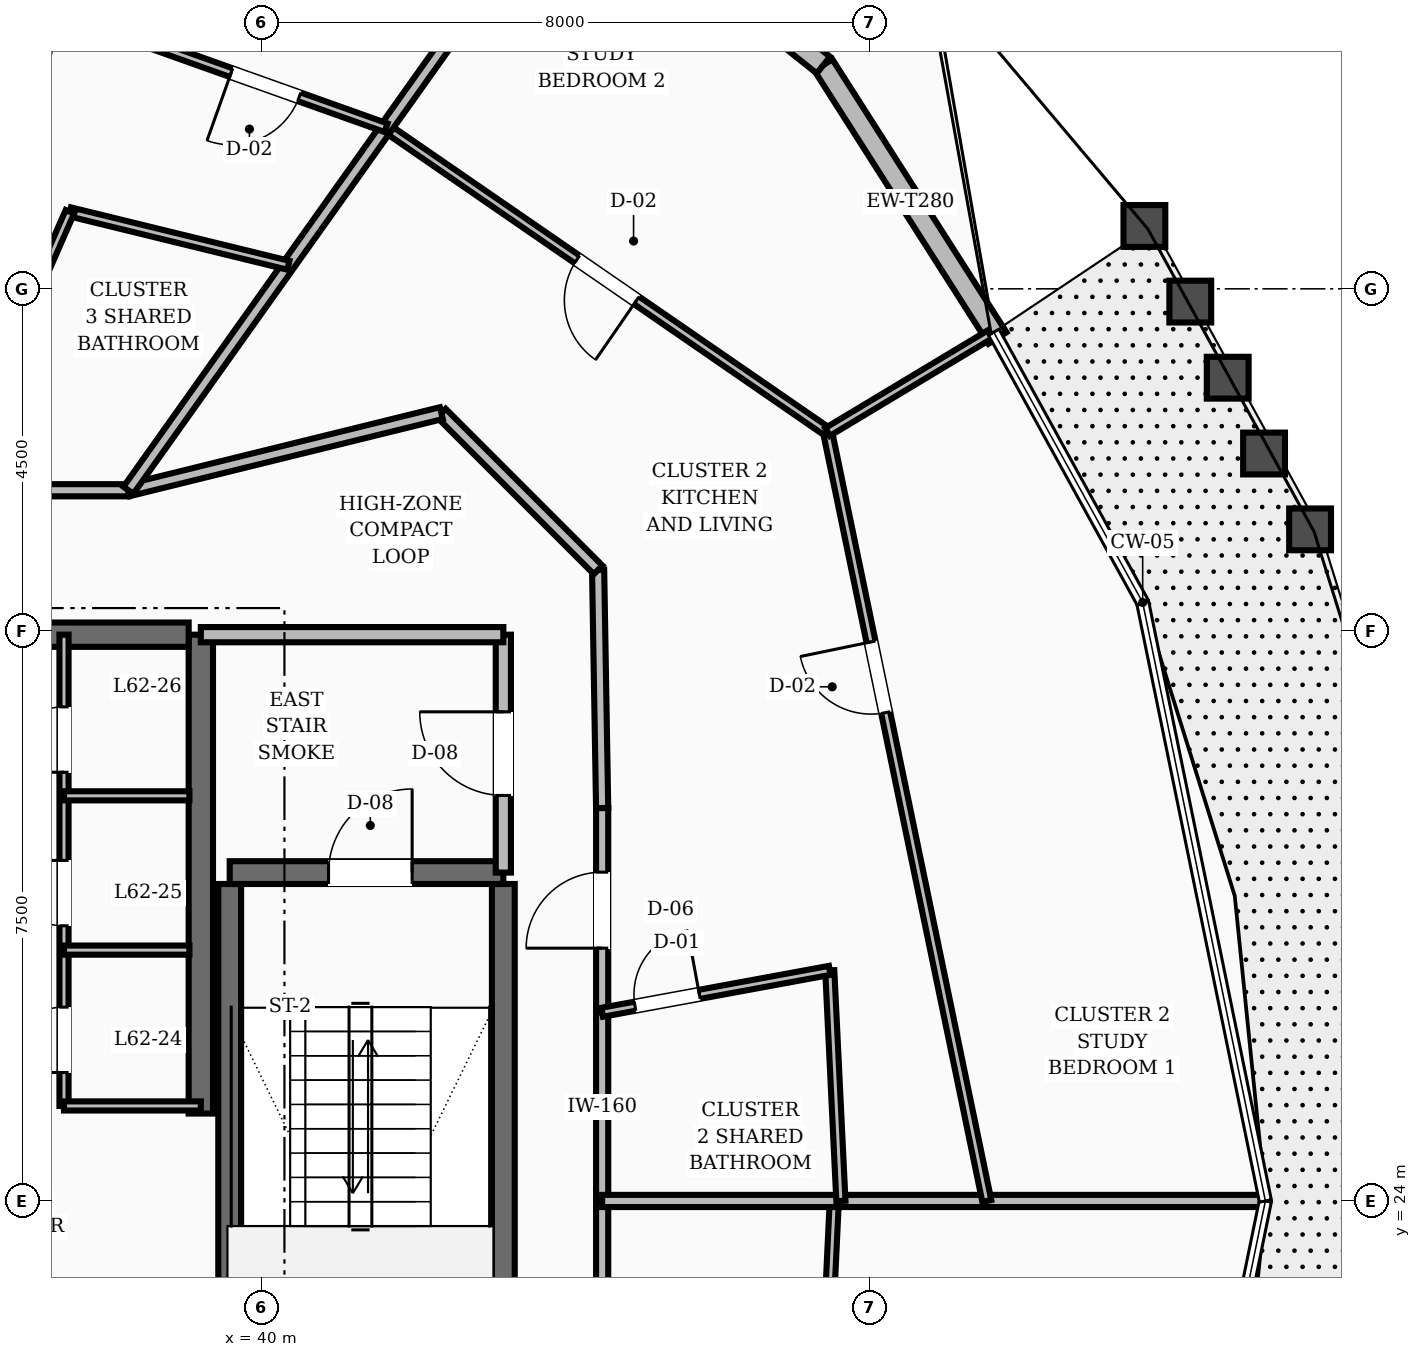
"""IFC4 building model, lengths in metres.
Left out: names, types, materials, properties, quantities, classifications, styles, units other than length and angle.
Written with IfcOpenShell. Run it as: python <this file> out.ifc"""

import sys

from ifc_helpers import new_model, si_unit, direction, frame, frame_2d, origin, place, context, subcontext, project, spatial, rectangle, extrude, element, fill, save


model = new_model("IFC4")
c1 = context("Model", 3, precision=1e-05, world=origin(), true_north=direction((0.0, 1.0)))
c2 = subcontext(c1, "Body", "Model", "MODEL_VIEW")
j1 = project(units=[si_unit("LENGTHUNIT", "METRE"), si_unit("PLANEANGLEUNIT", "RADIAN")], contexts=[c1])
p1 = place(None, origin())
s1 = spatial("IfcSite", under=j1, at=p1, CompositionType="ELEMENT")
p2 = place(p1, origin())
s2 = spatial("IfcBuilding", under=s1, at=p2, CompositionType="ELEMENT")
p3 = place(p2, frame((0.0, 0.0, 240.0)))
s3 = spatial("IfcBuildingStorey", under=s2, at=p3, CompositionType="ELEMENT", Elevation=240.0)
p4 = place(p3, frame((39.2, 25.15, 0.0), z_axis=(0.0, 0.0, 1.0), x_axis=(0.0, 1.0, 0.0)))
e1 = element("IfcWall", 1, at=p4, inside=s3, PredefinedType="SHEAR", context=c2, shape_type="SweptSolid", body=[
    extrude(rectangle(XDim=6.3, YDim=0.32, at=frame_2d((3.15, 0.0))), origin(), (0.0, 0.0, 1.0), 3.6),
])
p5 = place(p3, frame((35.8, 31.45, 0.0), z_axis=(0.0, 0.0, 1.0), x_axis=(1.0, 0.0, 0.0)))
e2 = element("IfcWall", 2, at=p5, inside=s3, PredefinedType="SHEAR", context=c2, shape_type="SweptSolid", body=[
    extrude(rectangle(XDim=3.24, YDim=0.32, at=frame_2d((1.62, 0.0))), origin(), (0.0, 0.0, 1.0), 3.6),
])
p6 = place(p5, frame((0.3, 0.0, 0.0)))
e3 = element("IfcOpeningElement", 3, at=p6, cuts=e2, PredefinedType="OPENING", context=c2, shape_type="SweptSolid", body=[
    extrude(rectangle(XDim=1.1, YDim=2.1, at=frame_2d((0.55, 1.05))), frame((0.0, 0.17, 0.0), z_axis=(0.0, -1.0, 0.0), x_axis=(1.0, 0.0, 0.0)), (0.0, 0.0, 1.0), 0.34),
])
for number, where, z_axis, x_axis in (
    (4, (43.18, 19.43, 0.0), (0.0, 0.0, 1.0), (0.0, 1.0, 0.0)),
    (5, (39.58, 19.43, 0.0), (0.0, 0.0, 1.0), (0.0, 1.0, 0.0)),
):
    element("IfcWall", number, at=place(p3, frame(where, z_axis=z_axis, x_axis=x_axis)), inside=s3, PredefinedType="SHEAR", context=c2, shape_type="SweptSolid", body=[
        extrude(rectangle(XDim=8.74, YDim=0.3, at=frame_2d((4.37, 0.0))), origin(), (0.0, 0.0, 1.0), 3.6),
    ])
p7 = place(p3, frame((39.58, 28.32, 0.0), z_axis=(0.0, 0.0, 1.0), x_axis=(1.0, 0.0, 0.0)))
e6 = element("IfcWall", 6, at=p7, inside=s3, PredefinedType="SHEAR", context=c2, shape_type="SweptSolid", body=[
    extrude(rectangle(XDim=3.6, YDim=0.3, at=frame_2d((1.8, 0.0))), origin(), (0.0, 0.0, 1.0), 3.6),
])
p8 = place(p7, frame((1.3, 0.0, 0.0)))
e7 = element("IfcOpeningElement", 7, at=p8, cuts=e6, PredefinedType="OPENING", context=c2, shape_type="SweptSolid", body=[
    extrude(rectangle(XDim=1.1, YDim=2.1, at=frame_2d((0.55, 1.05))), frame((0.0, 0.16, 0.0), z_axis=(0.0, -1.0, 0.0), x_axis=(1.0, 0.0, 0.0)), (0.0, 0.0, 1.0), 0.32),
])
p9 = place(p3, frame((49.681, 35.353, 0.0), z_axis=(0.0, 0.0, 1.0), x_axis=(-0.537776362765, 0.843087530243, 0.0)))
e8 = element("IfcWall", 8, at=p9, inside=s3, PredefinedType="STANDARD", context=c2, shape_type="SweptSolid", body=[
    extrude(rectangle(XDim=4.26, YDim=0.28, at=frame_2d((2.13, 0.0))), origin(), (0.0, 0.0, 1.0), 2.88),
])
p10 = place(p3, frame((47.39, 38.944, 0.0), z_axis=(0.0, 0.0, 1.0), x_axis=(-0.782030895384, 0.623239663906, 0.0)))
e9 = element("IfcWall", 9, at=p10, inside=s3, PredefinedType="STANDARD", context=c2, shape_type="SweptSolid", body=[
    extrude(rectangle(XDim=4.217, YDim=0.28, at=frame_2d((2.109, 0.0))), origin(), (0.0, 0.0, 1.0), 2.88),
])
p11 = place(p10, frame((0.809, 0.0, 0.8)))
e10 = element("IfcOpeningElement", 10, at=p11, cuts=e9, PredefinedType="OPENING", context=c2, shape_type="SweptSolid", body=[
    extrude(rectangle(XDim=2.6, YDim=1.65, at=frame_2d((1.3, 0.825))), frame((0.0, 0.15, 0.0), z_axis=(0.0, -1.0, 0.0), x_axis=(1.0, 0.0, 0.0)), (0.0, 0.0, 1.0), 0.3),
])
p12 = place(p3, frame((43.18, 28.32, 0.0), z_axis=(0.0, 0.0, 1.0), x_axis=(0.0, 1.0, 0.0)))
e11 = element("IfcWall", 11, at=p12, inside=s3, PredefinedType="SOLIDWALL", context=c2, shape_type="SweptSolid", body=[
    extrude(rectangle(XDim=3.13, YDim=0.2, at=frame_2d((1.565, 0.0))), origin(), (0.0, 0.0, 1.0), 2.87),
])
p13 = place(p12, frame((1.015, 0.0, 0.0)))
e12 = element("IfcOpeningElement", 12, at=p13, cuts=e11, PredefinedType="OPENING", context=c2, shape_type="SweptSolid", body=[
    extrude(rectangle(XDim=1.1, YDim=2.1, at=frame_2d((0.55, 1.05))), frame((0.0, 0.11, 0.0), z_axis=(0.0, -1.0, 0.0), x_axis=(1.0, 0.0, 0.0)), (0.0, 0.0, 1.0), 0.22),
])
p14 = place(p3, frame((39.2, 31.45, 0.0), z_axis=(0.0, 0.0, 1.0), x_axis=(1.0, 0.0, 0.0)))
e13 = element("IfcWall", 13, at=p14, inside=s3, PredefinedType="SOLIDWALL", context=c2, shape_type="SweptSolid", body=[
    extrude(rectangle(XDim=3.98, YDim=0.2, at=frame_2d((1.99, 0.0))), origin(), (0.0, 0.0, 1.0), 2.87),
])
p15 = place(p3, frame((37.4, 25.25, 0.0), z_axis=(0.0, 0.0, 1.0), x_axis=(0.0, 1.0, 0.0)))
e14 = element("IfcWall", 14, at=p15, inside=s3, PredefinedType="PARTITIONING", context=c2, shape_type="SweptSolid", body=[
    extrude(rectangle(XDim=6.2, YDim=0.12, at=frame_2d((3.1, 0.0))), origin(), (0.0, 0.0, 1.0), 2.87),
])
p16 = place(p15, frame((0.44, 0.0, 0.0)))
e15 = element("IfcOpeningElement", 15, at=p16, cuts=e14, PredefinedType="OPENING", context=c2, shape_type="SweptSolid", body=[
    extrude(rectangle(XDim=0.86, YDim=2.1, at=frame_2d((0.43, 1.05))), frame((0.0, 0.07, 0.0), z_axis=(0.0, -1.0, 0.0), x_axis=(1.0, 0.0, 0.0)), (0.0, 0.0, 1.0), 0.14),
])
p17 = place(p15, frame((2.37, 0.0, 0.0)))
e16 = element("IfcOpeningElement", 16, at=p17, cuts=e14, PredefinedType="OPENING", context=c2, shape_type="SweptSolid", body=[
    extrude(rectangle(XDim=0.86, YDim=2.1, at=frame_2d((0.43, 1.05))), frame((0.0, 0.07, 0.0), z_axis=(0.0, -1.0, 0.0), x_axis=(1.0, 0.0, 0.0)), (0.0, 0.0, 1.0), 0.14),
])
p18 = place(p15, frame((4.39, 0.0, 0.0)))
e17 = element("IfcOpeningElement", 17, at=p18, cuts=e14, PredefinedType="OPENING", context=c2, shape_type="SweptSolid", body=[
    extrude(rectangle(XDim=0.86, YDim=2.1, at=frame_2d((0.43, 1.05))), frame((0.0, 0.07, 0.0), z_axis=(0.0, -1.0, 0.0), x_axis=(1.0, 0.0, 0.0)), (0.0, 0.0, 1.0), 0.14),
])
p19 = place(p3, frame((37.4, 25.25, 0.0), z_axis=(0.0, 0.0, 1.0), x_axis=(1.0, 0.0, 0.0)))
e18 = element("IfcWall", 18, at=p19, inside=s3, PredefinedType="PARTITIONING", context=c2, shape_type="SweptSolid", body=[
    extrude(rectangle(XDim=1.8, YDim=0.12, at=frame_2d((0.9, 0.0))), origin(), (0.0, 0.0, 1.0), 2.87),
])
for number, where, z_axis, x_axis in (
    (19, (37.4, 27.3, 0.0), (0.0, 0.0, 1.0), (1.0, 0.0, 0.0)),
    (20, (37.4, 29.33, 0.0), (0.0, 0.0, 1.0), (1.0, 0.0, 0.0)),
):
    element("IfcWall", number, at=place(p3, frame(where, z_axis=z_axis, x_axis=x_axis)), inside=s3, PredefinedType="PARTITIONING", context=c2, shape_type="SweptSolid", body=[
        extrude(rectangle(XDim=1.65, YDim=0.12, at=frame_2d((0.825, 0.0))), origin(), (0.0, 0.0, 1.0), 2.87),
    ])
p20 = place(p3, frame((44.48, 24.0, 0.0), z_axis=(0.0, 0.0, 1.0), x_axis=(0.0, 1.0, 0.0)))
e21 = element("IfcWall", 21, at=p20, inside=s3, PredefinedType="SOLIDWALL", context=c2, shape_type="SweptSolid", body=[
    extrude(rectangle(XDim=2.482, YDim=0.16, at=frame_2d((1.241, 0.0))), origin(), (0.0, 0.0, 1.0), 2.87),
])
p21 = place(p3, frame((44.48, 26.482, 0.0), z_axis=(0.0, 0.0, 1.0), x_axis=(0.0, 1.0, 0.0)))
e22 = element("IfcWall", 22, at=p21, inside=s3, PredefinedType="SOLIDWALL", context=c2, shape_type="SweptSolid", body=[
    extrude(rectangle(XDim=2.687, YDim=0.16, at=frame_2d((1.344, 0.0))), origin(), (0.0, 0.0, 1.0), 2.87),
])
p22 = place(p21, frame((0.844, 0.0, 0.0)))
e23 = element("IfcOpeningElement", 23, at=p22, cuts=e22, PredefinedType="OPENING", context=c2, shape_type="SweptSolid", body=[
    extrude(rectangle(XDim=1.0, YDim=2.1, at=frame_2d((0.5, 1.05))), frame((0.0, 0.09, 0.0), z_axis=(0.0, -1.0, 0.0), x_axis=(1.0, 0.0, 0.0)), (0.0, 0.0, 1.0), 0.18),
])
p23 = place(p3, frame((44.48, 29.169, 0.0), z_axis=(0.0, 0.0, 1.0), x_axis=(-0.016981035134, 0.999855811828, 0.0)))
e24 = element("IfcWall", 24, at=p23, inside=s3, PredefinedType="SOLIDWALL", context=c2, shape_type="SweptSolid", body=[
    extrude(rectangle(XDim=3.134, YDim=0.16, at=frame_2d((1.567, 0.0))), origin(), (0.0, 0.0, 1.0), 2.87),
])
p24 = place(p3, frame((44.427, 32.303, 0.0), z_axis=(0.0, 0.0, 1.0), x_axis=(-0.707106781187, 0.707106781187, 0.0)))
e25 = element("IfcWall", 25, at=p24, inside=s3, PredefinedType="SOLIDWALL", context=c2, shape_type="SweptSolid", body=[
    extrude(rectangle(XDim=2.916, YDim=0.16, at=frame_2d((1.458, 0.0))), origin(), (0.0, 0.0, 1.0), 2.87),
])
p25 = place(p3, frame((42.365, 34.365, 0.0), z_axis=(0.0, 0.0, 1.0), x_axis=(-0.970939799552, -0.239323850978, 0.0)))
e26 = element("IfcWall", 26, at=p25, inside=s3, PredefinedType="SOLIDWALL", context=c2, shape_type="SweptSolid", body=[
    extrude(rectangle(XDim=4.241, YDim=0.16, at=frame_2d((2.12, 0.0))), origin(), (0.0, 0.0, 1.0), 2.87),
])
p26 = place(p3, frame((38.248, 33.35, 0.0), z_axis=(0.0, 0.0, 1.0), x_axis=(-1.0, 0.0, 0.0)))
e27 = element("IfcWall", 27, at=p26, inside=s3, PredefinedType="SOLIDWALL", context=c2, shape_type="SweptSolid", body=[
    extrude(rectangle(XDim=2.375, YDim=0.16, at=frame_2d((1.188, 0.0))), origin(), (0.0, 0.0, 1.0), 2.87),
])
p27 = place(p3, frame((44.48, 21.518, 0.0), z_axis=(0.0, 0.0, 1.0), x_axis=(0.0, 1.0, 0.0)))
e28 = element("IfcWall", 28, at=p27, inside=s3, PredefinedType="SOLIDWALL", context=c2, shape_type="SweptSolid", body=[
    extrude(rectangle(XDim=2.482, YDim=0.16, at=frame_2d((1.241, 0.0))), origin(), (0.0, 0.0, 1.0), 2.87),
])
p28 = place(p3, frame((47.391, 20.982, 0.0), z_axis=(0.0, 0.0, 1.0), x_axis=(0.047185110315, 0.998886162365, 0.0)))
e29 = element("IfcWall", 29, at=p28, inside=s3, PredefinedType="PARTITIONING", context=c2, shape_type="SweptSolid", body=[
    extrude(rectangle(XDim=3.022, YDim=0.12, at=frame_2d((1.511, 0.0))), origin(), (0.0, 0.0, 1.0), 2.87),
])
p29 = place(p3, frame((44.48, 24.0, 0.0), z_axis=(0.0, 0.0, 1.0), x_axis=(1.0, 0.0, 0.0)))
e30 = element("IfcWall", 30, at=p29, inside=s3, PredefinedType="SOLIDWALL", context=c2, shape_type="SweptSolid", body=[
    extrude(rectangle(XDim=8.676, YDim=0.16, at=frame_2d((4.338, 0.0))), origin(), (0.0, 0.0, 1.0), 2.87),
])
p30 = place(p3, frame((47.621, 24.0, 0.0), z_axis=(0.0, 0.0, 1.0), x_axis=(-0.048309856008, 0.998832397258, 0.0)))
e31 = element("IfcWall", 31, at=p30, inside=s3, PredefinedType="PARTITIONING", context=c2, shape_type="SweptSolid", body=[
    extrude(rectangle(XDim=3.037, YDim=0.12, at=frame_2d((1.519, 0.0))), origin(), (0.0, 0.0, 1.0), 2.87),
])
p31 = place(p3, frame((44.48, 26.482, 0.0), z_axis=(0.0, 0.0, 1.0), x_axis=(0.983472356652, 0.181058343361, 0.0)))
e32 = element("IfcWall", 32, at=p31, inside=s3, PredefinedType="PARTITIONING", context=c2, shape_type="SweptSolid", body=[
    extrude(rectangle(XDim=3.045, YDim=0.12, at=frame_2d((1.522, 0.0))), origin(), (0.0, 0.0, 1.0), 2.87),
])
p32 = place(p31, frame((0.44, 0.0, 0.0)))
e33 = element("IfcOpeningElement", 33, at=p32, cuts=e32, PredefinedType="OPENING", context=c2, shape_type="SweptSolid", body=[
    extrude(rectangle(XDim=0.86, YDim=2.1, at=frame_2d((0.43, 1.05))), frame((0.0, 0.07, 0.0), z_axis=(0.0, -1.0, 0.0), x_axis=(1.0, 0.0, 0.0)), (0.0, 0.0, 1.0), 0.14),
])
p33 = place(p3, frame((49.541, 24.0, 0.0), z_axis=(0.0, 0.0, 1.0), x_axis=(-0.202796260228, 0.979220954043, 0.0)))
e34 = element("IfcWall", 34, at=p33, inside=s3, PredefinedType="PARTITIONING", context=c2, shape_type="SweptSolid", body=[
    extrude(rectangle(XDim=10.332, YDim=0.12, at=frame_2d((5.166, 0.0))), origin(), (0.0, 0.0, 1.0), 2.87),
])
p34 = place(p33, frame((6.561, 0.0, 0.0)))
e35 = element("IfcOpeningElement", 35, at=p34, cuts=e34, PredefinedType="OPENING", context=c2, shape_type="SweptSolid", body=[
    extrude(rectangle(XDim=0.95, YDim=2.1, at=frame_2d((0.475, 1.05))), frame((0.0, 0.07, 0.0), z_axis=(0.0, -1.0, 0.0), x_axis=(1.0, 0.0, 0.0)), (0.0, 0.0, 1.0), 0.14),
])
p35 = place(p3, frame((47.446, 34.117, 0.0), z_axis=(0.0, 0.0, 1.0), x_axis=(-0.823453694919, 0.567383479072, 0.0)))
e36 = element("IfcWall", 36, at=p35, inside=s3, PredefinedType="PARTITIONING", context=c2, shape_type="SweptSolid", body=[
    extrude(rectangle(XDim=7.053, YDim=0.12, at=frame_2d((3.527, 0.0))), origin(), (0.0, 0.0, 1.0), 2.87),
])
p36 = place(p35, frame((3.052, 0.0, 0.0)))
e37 = element("IfcOpeningElement", 37, at=p36, cuts=e36, PredefinedType="OPENING", context=c2, shape_type="SweptSolid", body=[
    extrude(rectangle(XDim=0.95, YDim=2.1, at=frame_2d((0.475, 1.05))), frame((0.0, 0.07, 0.0), z_axis=(0.0, -1.0, 0.0), x_axis=(1.0, 0.0, 0.0)), (0.0, 0.0, 1.0), 0.14),
])
p37 = place(p3, frame((47.446, 34.117, 0.0), z_axis=(0.0, 0.0, 1.0), x_axis=(0.85718258358, 0.515012639075, 0.0)))
e38 = element("IfcWall", 38, at=p37, inside=s3, PredefinedType="PARTITIONING", context=c2, shape_type="SweptSolid", body=[
    extrude(rectangle(XDim=2.5, YDim=0.12, at=frame_2d((1.25, 0.0))), origin(), (0.0, 0.0, 1.0), 2.87),
])
p38 = place(p3, frame((38.248, 33.35, 0.0), z_axis=(0.0, 0.0, 1.0), x_axis=(0.579377676694, 0.815059205058, 0.0)))
e39 = element("IfcWall", 39, at=p38, inside=s3, PredefinedType="SOLIDWALL", context=c2, shape_type="SweptSolid", body=[
    extrude(rectangle(XDim=10.038, YDim=0.16, at=frame_2d((5.019, 0.0))), origin(), (0.0, 0.0, 1.0), 2.87),
])
p39 = place(p3, frame((40.352, 36.31, 0.0), z_axis=(0.0, 0.0, 1.0), x_axis=(-0.971357969052, 0.237620908084, 0.0)))
e40 = element("IfcWall", 40, at=p39, inside=s3, PredefinedType="PARTITIONING", context=c2, shape_type="SweptSolid", body=[
    extrude(rectangle(XDim=2.959, YDim=0.12, at=frame_2d((1.479, 0.0))), origin(), (0.0, 0.0, 1.0), 2.87),
])
p40 = place(p3, frame((35.873, 33.35, 0.0), z_axis=(0.0, 0.0, 1.0), x_axis=(0.401215916975, 0.915983508566, 0.0)))
e41 = element("IfcWall", 41, at=p40, inside=s3, PredefinedType="PARTITIONING", context=c2, shape_type="SweptSolid", body=[
    extrude(rectangle(XDim=3.999, YDim=0.12, at=frame_2d((2.0, 0.0))), origin(), (0.0, 0.0, 1.0), 2.87),
])
p41 = place(p40, frame((0.44, 0.0, 0.0)))
e42 = element("IfcOpeningElement", 42, at=p41, cuts=e41, PredefinedType="OPENING", context=c2, shape_type="SweptSolid", body=[
    extrude(rectangle(XDim=0.86, YDim=2.1, at=frame_2d((0.43, 1.05))), frame((0.0, 0.07, 0.0), z_axis=(0.0, -1.0, 0.0), x_axis=(1.0, 0.0, 0.0)), (0.0, 0.0, 1.0), 0.14),
])
p42 = place(p3, frame((41.637, 38.119, 0.0), z_axis=(0.0, 0.0, 1.0), x_axis=(-0.942011593526, 0.335580329671, 0.0)))
e43 = element("IfcWall", 43, at=p42, inside=s3, PredefinedType="PARTITIONING", context=c2, shape_type="SweptSolid", body=[
    extrude(rectangle(XDim=3.376, YDim=0.12, at=frame_2d((1.688, 0.0))), origin(), (0.0, 0.0, 1.0), 2.87),
])
p43 = place(p42, frame((1.213, 0.0, 0.0)))
e44 = element("IfcOpeningElement", 44, at=p43, cuts=e43, PredefinedType="OPENING", context=c2, shape_type="SweptSolid", body=[
    extrude(rectangle(XDim=0.95, YDim=2.1, at=frame_2d((0.475, 1.05))), frame((0.0, 0.07, 0.0), z_axis=(0.0, -1.0, 0.0), x_axis=(1.0, 0.0, 0.0)), (0.0, 0.0, 1.0), 0.14),
])
p44 = place(p8, origin())
e45 = element("IfcDoor", 45, at=p44, inside=s3, OperationType="SINGLE_SWING_RIGHT", PredefinedType="DOOR", context=c2, shape_type="SweptSolid", body=[
    extrude(rectangle(XDim=1.1, YDim=2.1, at=frame_2d((0.55, 1.05))), frame((0.0, 0.025, 0.0), z_axis=(0.0, -1.0, 0.0), x_axis=(1.0, 0.0, 0.0)), (0.0, 0.0, 1.0), 0.05),
])
fill(e7, e45)
p45 = place(p13, origin())
e46 = element("IfcDoor", 46, at=p45, inside=s3, OperationType="SINGLE_SWING_RIGHT", PredefinedType="DOOR", context=c2, shape_type="SweptSolid", body=[
    extrude(rectangle(XDim=1.1, YDim=2.1, at=frame_2d((0.55, 1.05))), frame((0.0, 0.025, 0.0), z_axis=(0.0, -1.0, 0.0), x_axis=(1.0, 0.0, 0.0)), (0.0, 0.0, 1.0), 0.05),
])
fill(e12, e46)
p46 = place(p16, origin())
e47 = element("IfcDoor", 47, at=p46, inside=s3, OperationType="SINGLE_SWING_LEFT", PredefinedType="DOOR", context=c2, shape_type="SweptSolid", body=[
    extrude(rectangle(XDim=0.86, YDim=2.1, at=frame_2d((0.43, 1.05))), frame((0.0, 0.025, 0.0), z_axis=(0.0, -1.0, 0.0), x_axis=(1.0, 0.0, 0.0)), (0.0, 0.0, 1.0), 0.05),
])
fill(e15, e47)
p47 = place(p17, origin())
e48 = element("IfcDoor", 48, at=p47, inside=s3, OperationType="SINGLE_SWING_RIGHT", PredefinedType="DOOR", context=c2, shape_type="SweptSolid", body=[
    extrude(rectangle(XDim=0.86, YDim=2.1, at=frame_2d((0.43, 1.05))), frame((0.0, 0.025, 0.0), z_axis=(0.0, -1.0, 0.0), x_axis=(1.0, 0.0, 0.0)), (0.0, 0.0, 1.0), 0.05),
])
fill(e16, e48)
p48 = place(p18, origin())
e49 = element("IfcDoor", 49, at=p48, inside=s3, OperationType="SINGLE_SWING_LEFT", PredefinedType="DOOR", context=c2, shape_type="SweptSolid", body=[
    extrude(rectangle(XDim=0.86, YDim=2.1, at=frame_2d((0.43, 1.05))), frame((0.0, 0.025, 0.0), z_axis=(0.0, -1.0, 0.0), x_axis=(1.0, 0.0, 0.0)), (0.0, 0.0, 1.0), 0.05),
])
fill(e17, e49)
p49 = place(p32, origin())
e50 = element("IfcDoor", 50, at=p49, inside=s3, OperationType="SINGLE_SWING_RIGHT", PredefinedType="DOOR", context=c2, shape_type="SweptSolid", body=[
    extrude(rectangle(XDim=0.86, YDim=2.1, at=frame_2d((0.43, 1.05))), frame((0.0, 0.025, 0.0), z_axis=(0.0, -1.0, 0.0), x_axis=(1.0, 0.0, 0.0)), (0.0, 0.0, 1.0), 0.05),
])
fill(e33, e50)
p50 = place(p22, origin())
e51 = element("IfcDoor", 51, at=p50, inside=s3, OperationType="SINGLE_SWING_LEFT", PredefinedType="DOOR", context=c2, shape_type="SweptSolid", body=[
    extrude(rectangle(XDim=1.0, YDim=2.1, at=frame_2d((0.5, 1.05))), frame((0.0, 0.025, 0.0), z_axis=(0.0, -1.0, 0.0), x_axis=(1.0, 0.0, 0.0)), (0.0, 0.0, 1.0), 0.05),
])
fill(e23, e51)
p51 = place(p34, origin())
e52 = element("IfcDoor", 52, at=p51, inside=s3, OperationType="SINGLE_SWING_RIGHT", PredefinedType="DOOR", context=c2, shape_type="SweptSolid", body=[
    extrude(rectangle(XDim=0.95, YDim=2.1, at=frame_2d((0.475, 1.05))), frame((0.0, 0.025, 0.0), z_axis=(0.0, -1.0, 0.0), x_axis=(1.0, 0.0, 0.0)), (0.0, 0.0, 1.0), 0.05),
])
fill(e35, e52)
p52 = place(p36, origin())
e53 = element("IfcDoor", 53, at=p52, inside=s3, OperationType="SINGLE_SWING_LEFT", PredefinedType="DOOR", context=c2, shape_type="SweptSolid", body=[
    extrude(rectangle(XDim=0.95, YDim=2.1, at=frame_2d((0.475, 1.05))), frame((0.0, 0.025, 0.0), z_axis=(0.0, -1.0, 0.0), x_axis=(1.0, 0.0, 0.0)), (0.0, 0.0, 1.0), 0.05),
])
fill(e37, e53)
p53 = place(p43, origin())
e54 = element("IfcDoor", 54, at=p53, inside=s3, OperationType="SINGLE_SWING_RIGHT", PredefinedType="DOOR", context=c2, shape_type="SweptSolid", body=[
    extrude(rectangle(XDim=0.95, YDim=2.1, at=frame_2d((0.475, 1.05))), frame((0.0, 0.025, 0.0), z_axis=(0.0, -1.0, 0.0), x_axis=(1.0, 0.0, 0.0)), (0.0, 0.0, 1.0), 0.05),
])
fill(e44, e54)
save(model, sys.argv[1])
